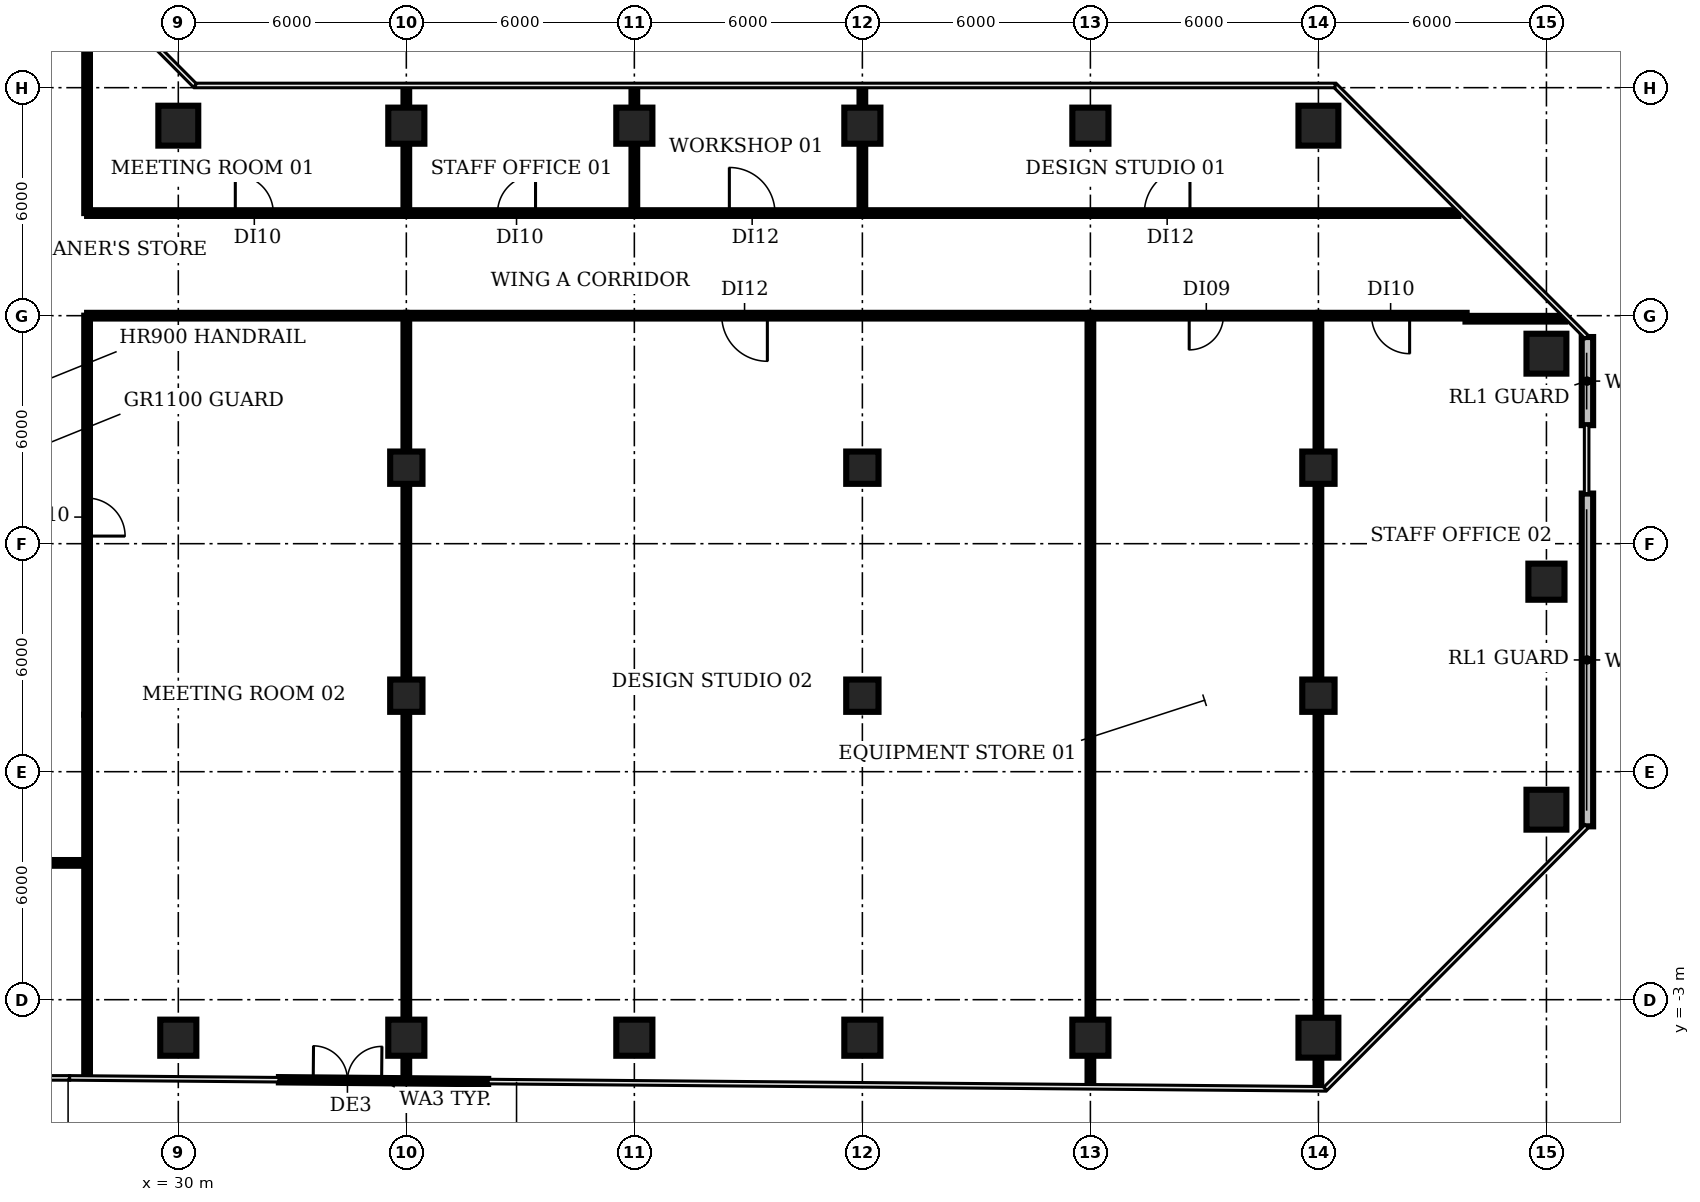
"""IFC4 building model, lengths in metres.
Left out: names, types, materials, properties, quantities, classifications, styles, units other than length and angle.
Written with IfcOpenShell. Run it as: python <this file> out.ifc"""

import sys

from ifc_helpers import new_model, si_unit, direction, frame, frame_2d, origin, origin_2d, place, context, subcontext, project, spatial, rectangle, circle, extrude, element, fill, save


model = new_model("IFC4")
c1 = context("Model", 3, precision=1e-05, world=origin(), true_north=direction((0.0, 1.0)))
c2 = subcontext(c1, "Body", "Model", "MODEL_VIEW")
j1 = project(units=[si_unit("LENGTHUNIT", "METRE"), si_unit("PLANEANGLEUNIT", "RADIAN")], contexts=[c1])
p1 = place(None, origin())
s1 = spatial("IfcSite", under=j1, at=p1, CompositionType="ELEMENT")
p2 = place(p1, origin())
s2 = spatial("IfcBuilding", under=s1, at=p2, CompositionType="ELEMENT")
p3 = place(p2, frame((0.0, 0.0, 50.0)))
s3 = spatial("IfcBuildingStorey", under=s2, at=p3, CompositionType="ELEMENT", Elevation=50.0)
p4 = place(p3, frame((30.0, -4.0, 0.0), z_axis=(0.0, 0.0, 1.0), x_axis=(1.0, 0.0, 0.0)))
e1 = element("IfcColumn", 1, at=p4, inside=s3, PredefinedType="COLUMN", context=c2, shape_type="SweptSolid", body=[
    extrude(rectangle(XDim=0.95, YDim=0.95, at=origin_2d()), origin(), (0.0, 0.0, 1.0), 3.85),
])
p5 = place(p3, frame((30.0, 20.0, 0.0), z_axis=(0.0, 0.0, 1.0), x_axis=(1.0, 0.0, 0.0)))
e2 = element("IfcColumn", 2, at=p5, inside=s3, PredefinedType="COLUMN", context=c2, shape_type="SweptSolid", body=[
    extrude(circle(Radius=0.525, at=origin_2d()), origin(), (0.0, 0.0, 1.0), 3.85),
])
p6 = place(p3, frame((36.0, -4.0, 0.0), z_axis=(0.0, 0.0, 1.0), x_axis=(1.0, 0.0, 0.0)))
e3 = element("IfcColumn", 3, at=p6, inside=s3, PredefinedType="COLUMN", context=c2, shape_type="SweptSolid", body=[
    extrude(rectangle(XDim=0.95, YDim=0.95, at=origin_2d()), origin(), (0.0, 0.0, 1.0), 3.85),
])
for number, where, z_axis, x_axis in (
    (4, (36.0, 5.0, 0.0), (0.0, 0.0, 1.0), (1.0, 0.0, 0.0)),
    (5, (36.0, 11.0, 0.0), (0.0, 0.0, 1.0), (1.0, 0.0, 0.0)),
):
    element("IfcColumn", number, at=place(p3, frame(where, z_axis=z_axis, x_axis=x_axis)), inside=s3, PredefinedType="COLUMN", context=c2, shape_type="SweptSolid", body=[
        extrude(rectangle(XDim=0.85, YDim=0.85, at=origin_2d()), origin(), (0.0, 0.0, 1.0), 3.85),
    ])
for number, where, z_axis, x_axis in (
    (6, (36.0, 20.0, 0.0), (0.0, 0.0, 1.0), (1.0, 0.0, 0.0)),
    (7, (42.0, -4.0, 0.0), (0.0, 0.0, 1.0), (1.0, 0.0, 0.0)),
    (8, (42.0, 20.0, 0.0), (0.0, 0.0, 1.0), (1.0, 0.0, 0.0)),
    (9, (48.0, -4.0, 0.0), (0.0, 0.0, 1.0), (1.0, 0.0, 0.0)),
):
    element("IfcColumn", number, at=place(p3, frame(where, z_axis=z_axis, x_axis=x_axis)), inside=s3, PredefinedType="COLUMN", context=c2, shape_type="SweptSolid", body=[
        extrude(rectangle(XDim=0.95, YDim=0.95, at=origin_2d()), origin(), (0.0, 0.0, 1.0), 3.85),
    ])
for number, where, z_axis, x_axis in (
    (10, (48.0, 5.0, 0.0), (0.0, 0.0, 1.0), (1.0, 0.0, 0.0)),
    (11, (48.0, 11.0, 0.0), (0.0, 0.0, 1.0), (1.0, 0.0, 0.0)),
):
    element("IfcColumn", number, at=place(p3, frame(where, z_axis=z_axis, x_axis=x_axis)), inside=s3, PredefinedType="COLUMN", context=c2, shape_type="SweptSolid", body=[
        extrude(rectangle(XDim=0.85, YDim=0.85, at=origin_2d()), origin(), (0.0, 0.0, 1.0), 3.85),
    ])
for number, where, z_axis, x_axis in (
    (12, (48.0, 20.0, 0.0), (0.0, 0.0, 1.0), (1.0, 0.0, 0.0)),
    (13, (54.0, -4.0, 0.0), (0.0, 0.0, 1.0), (1.0, 0.0, 0.0)),
    (14, (54.0, 20.0, 0.0), (0.0, 0.0, 1.0), (1.0, 0.0, 0.0)),
):
    element("IfcColumn", number, at=place(p3, frame(where, z_axis=z_axis, x_axis=x_axis)), inside=s3, PredefinedType="COLUMN", context=c2, shape_type="SweptSolid", body=[
        extrude(rectangle(XDim=0.95, YDim=0.95, at=origin_2d()), origin(), (0.0, 0.0, 1.0), 3.85),
    ])
p7 = place(p3, frame((60.0, -4.0, 0.0), z_axis=(0.0, 0.0, 1.0), x_axis=(1.0, 0.0, 0.0)))
e15 = element("IfcColumn", 15, at=p7, inside=s3, PredefinedType="COLUMN", context=c2, shape_type="SweptSolid", body=[
    extrude(circle(Radius=0.525, at=origin_2d()), origin(), (0.0, 0.0, 1.0), 3.85),
])
for number, where, z_axis, x_axis in (
    (16, (60.0, 5.0, 0.0), (0.0, 0.0, 1.0), (1.0, 0.0, 0.0)),
    (17, (60.0, 11.0, 0.0), (0.0, 0.0, 1.0), (1.0, 0.0, 0.0)),
):
    element("IfcColumn", number, at=place(p3, frame(where, z_axis=z_axis, x_axis=x_axis)), inside=s3, PredefinedType="COLUMN", context=c2, shape_type="SweptSolid", body=[
        extrude(rectangle(XDim=0.85, YDim=0.85, at=origin_2d()), origin(), (0.0, 0.0, 1.0), 3.85),
    ])
for number, where, z_axis, x_axis in (
    (18, (60.0, 20.0, 0.0), (0.0, 0.0, 1.0), (1.0, 0.0, 0.0)),
    (19, (66.0, 2.0, 0.0), (0.0, 0.0, 1.0), (1.0, 0.0, 0.0)),
):
    element("IfcColumn", number, at=place(p3, frame(where, z_axis=z_axis, x_axis=x_axis)), inside=s3, PredefinedType="COLUMN", context=c2, shape_type="SweptSolid", body=[
        extrude(circle(Radius=0.525, at=origin_2d()), origin(), (0.0, 0.0, 1.0), 3.85),
    ])
p8 = place(p3, frame((66.0, 8.0, 0.0), z_axis=(0.0, 0.0, 1.0), x_axis=(1.0, 0.0, 0.0)))
e20 = element("IfcColumn", 20, at=p8, inside=s3, PredefinedType="COLUMN", context=c2, shape_type="SweptSolid", body=[
    extrude(rectangle(XDim=0.95, YDim=0.95, at=origin_2d()), origin(), (0.0, 0.0, 1.0), 3.85),
])
p9 = place(p3, frame((66.0, 14.0, 0.0), z_axis=(0.0, 0.0, 1.0), x_axis=(1.0, 0.0, 0.0)))
e21 = element("IfcColumn", 21, at=p9, inside=s3, PredefinedType="COLUMN", context=c2, shape_type="SweptSolid", body=[
    extrude(circle(Radius=0.525, at=origin_2d()), origin(), (0.0, 0.0, 1.0), 3.85),
])
p10 = place(p3, frame((32.647, -5.106, 0.0), z_axis=(0.0, 0.0, 1.0), x_axis=(0.999962248572, -0.008689155911, 0.0)))
e22 = element("IfcWall", 22, at=p10, inside=s3, PredefinedType="SOLIDWALL", context=c2, shape_type="SweptSolid", body=[
    extrude(rectangle(XDim=5.507, YDim=0.14, at=frame_2d((2.753, 0.0))), origin(), (0.0, 0.0, 1.0), 3.85),
])
p11 = place(p10, frame((0.903, 0.0, 0.0)))
e23 = element("IfcOpeningElement", 23, at=p11, cuts=e22, PredefinedType="OPENING", context=c2, shape_type="SweptSolid", body=[
    extrude(rectangle(XDim=1.8, YDim=2.4, at=frame_2d((0.9, 1.2))), frame((0.0, 0.08, 0.0), z_axis=(0.0, -1.0, 0.0), x_axis=(1.0, 0.0, 0.0)), (0.0, 0.0, 1.0), 0.16),
])
p12 = place(p3, frame((67.079, 1.562, 0.0), z_axis=(0.0, 0.0, 1.0), x_axis=(0.0, 1.0, 0.0)))
e24 = element("IfcWall", 24, at=p12, inside=s3, PredefinedType="SOLIDWALL", context=c2, shape_type="SweptSolid", body=[
    extrude(rectangle(XDim=8.757, YDim=0.3, at=frame_2d((4.379, 0.0))), origin(), (0.0, 0.0, 1.0), 3.85),
])
p13 = place(p3, frame((67.079, 12.119, 0.0), z_axis=(0.0, 0.0, 1.0), x_axis=(0.0, 1.0, 0.0)))
e25 = element("IfcWall", 25, at=p13, inside=s3, PredefinedType="SOLIDWALL", context=c2, shape_type="SweptSolid", body=[
    extrude(rectangle(XDim=2.319, YDim=0.3, at=frame_2d((1.16, 0.0))), origin(), (0.0, 0.0, 1.0), 3.85),
])
p14 = place(p3, frame((27.6, -5.01, 0.0), z_axis=(0.0, 0.0, 1.0), x_axis=(0.0, 1.0, 0.0)))
e26 = element("IfcWall", 26, at=p14, inside=s3, PredefinedType="PARTITIONING", context=c2, shape_type="SweptSolid", body=[
    extrude(rectangle(XDim=5.61, YDim=0.15, at=frame_2d((2.805, 0.0))), origin(), (0.0, 0.0, 1.0), 2.83),
])
p15 = place(p3, frame((27.6, 0.6, 0.0), z_axis=(0.0, 0.0, 1.0), x_axis=(-1.0, 0.0, 0.0)))
e27 = element("IfcWall", 27, at=p15, inside=s3, PredefinedType="PARTITIONING", context=c2, shape_type="SweptSolid", body=[
    extrude(rectangle(XDim=25.2, YDim=0.15, at=frame_2d((12.6, 0.0))), origin(), (0.0, 0.0, 1.0), 2.83),
])
p16 = place(p15, frame((12.1, 0.0, 0.0)))
e28 = element("IfcOpeningElement", 28, at=p16, cuts=e27, PredefinedType="OPENING", context=c2, shape_type="SweptSolid", body=[
    extrude(rectangle(XDim=1.2, YDim=2.1, at=frame_2d((0.6, 1.05))), frame((0.0, 0.085, 0.0), z_axis=(0.0, -1.0, 0.0), x_axis=(1.0, 0.0, 0.0)), (0.0, 0.0, 1.0), 0.17),
])
p17 = place(p3, frame((27.6, 0.6, 0.0), z_axis=(0.0, 0.0, 1.0), x_axis=(0.0, 1.0, 0.0)))
e29 = element("IfcWall", 29, at=p17, inside=s3, PredefinedType="PARTITIONING", context=c2, shape_type="SweptSolid", body=[
    extrude(rectangle(XDim=3.9, YDim=0.15, at=frame_2d((1.95, 0.0))), origin(), (0.0, 0.0, 1.0), 2.83),
])
p18 = place(p3, frame((27.6, 15.0, 0.0), z_axis=(0.0, 0.0, 1.0), x_axis=(0.0, -1.0, 0.0)))
e30 = element("IfcWall", 30, at=p18, inside=s3, PredefinedType="PARTITIONING", context=c2, shape_type="SweptSolid", body=[
    extrude(rectangle(XDim=10.5, YDim=0.15, at=frame_2d((5.25, 0.0))), origin(), (0.0, 0.0, 1.0), 2.83),
])
p19 = place(p18, frame((4.8, 0.0, 0.0)))
e31 = element("IfcOpeningElement", 31, at=p19, cuts=e30, PredefinedType="OPENING", context=c2, shape_type="SweptSolid", body=[
    extrude(rectangle(XDim=1.0, YDim=2.1, at=frame_2d((0.5, 1.05))), frame((0.0, 0.085, 0.0), z_axis=(0.0, -1.0, 0.0), x_axis=(1.0, 0.0, 0.0)), (0.0, 0.0, 1.0), 0.17),
])
p20 = place(p3, frame((27.6, 15.0, 0.0), z_axis=(0.0, 0.0, 1.0), x_axis=(1.0, 0.0, 0.0)))
e32 = element("IfcWall", 32, at=p20, inside=s3, PredefinedType="PARTITIONING", context=c2, shape_type="SweptSolid", body=[
    extrude(rectangle(XDim=8.4, YDim=0.15, at=frame_2d((4.2, 0.0))), origin(), (0.0, 0.0, 1.0), 2.83),
])
p21 = place(p3, frame((27.6, 17.7, 0.0), z_axis=(0.0, 0.0, 1.0), x_axis=(0.0, 1.0, 0.0)))
e33 = element("IfcWall", 33, at=p21, inside=s3, PredefinedType="PARTITIONING", context=c2, shape_type="SweptSolid", body=[
    extrude(rectangle(XDim=6.14, YDim=0.15, at=frame_2d((3.07, 0.0))), origin(), (0.0, 0.0, 1.0), 2.83),
])
p22 = place(p3, frame((27.6, 17.7, 0.0), z_axis=(0.0, 0.0, 1.0), x_axis=(1.0, 0.0, 0.0)))
e34 = element("IfcWall", 34, at=p22, inside=s3, PredefinedType="PARTITIONING", context=c2, shape_type="SweptSolid", body=[
    extrude(rectangle(XDim=8.4, YDim=0.15, at=frame_2d((4.2, 0.0))), origin(), (0.0, 0.0, 1.0), 2.83),
])
p23 = place(p22, frame((3.9, 0.0, 0.0)))
e35 = element("IfcOpeningElement", 35, at=p23, cuts=e34, PredefinedType="OPENING", context=c2, shape_type="SweptSolid", body=[
    extrude(rectangle(XDim=1.0, YDim=2.1, at=frame_2d((0.5, 1.05))), frame((0.0, 0.085, 0.0), z_axis=(0.0, -1.0, 0.0), x_axis=(1.0, 0.0, 0.0)), (0.0, 0.0, 1.0), 0.17),
])
p24 = place(p3, frame((36.0, -5.09, 0.0), z_axis=(0.0, 0.0, 1.0), x_axis=(0.0, 1.0, 0.0)))
e36 = element("IfcWall", 36, at=p24, inside=s3, PredefinedType="PARTITIONING", context=c2, shape_type="SweptSolid", body=[
    extrude(rectangle(XDim=20.09, YDim=0.15, at=frame_2d((10.045, 0.0))), origin(), (0.0, 0.0, 1.0), 2.83),
])
p25 = place(p3, frame((36.0, 17.7, 0.0), z_axis=(0.0, 0.0, 1.0), x_axis=(0.0, 1.0, 0.0)))
e37 = element("IfcWall", 37, at=p25, inside=s3, PredefinedType="PARTITIONING", context=c2, shape_type="SweptSolid", body=[
    extrude(rectangle(XDim=3.31, YDim=0.15, at=frame_2d((1.655, 0.0))), origin(), (0.0, 0.0, 1.0), 2.83),
])
p26 = place(p3, frame((36.0, 17.7, 0.0), z_axis=(0.0, 0.0, 1.0), x_axis=(1.0, 0.0, 0.0)))
e38 = element("IfcWall", 38, at=p26, inside=s3, PredefinedType="PARTITIONING", context=c2, shape_type="SweptSolid", body=[
    extrude(rectangle(XDim=6.0, YDim=0.15, at=frame_2d((3.0, 0.0))), origin(), (0.0, 0.0, 1.0), 2.83),
])
p27 = place(p26, frame((2.4, 0.0, 0.0)))
e39 = element("IfcOpeningElement", 39, at=p27, cuts=e38, PredefinedType="OPENING", context=c2, shape_type="SweptSolid", body=[
    extrude(rectangle(XDim=1.0, YDim=2.1, at=frame_2d((0.5, 1.05))), frame((0.0, 0.085, 0.0), z_axis=(0.0, -1.0, 0.0), x_axis=(1.0, 0.0, 0.0)), (0.0, 0.0, 1.0), 0.17),
])
p28 = place(p3, frame((42.0, 17.7, 0.0), z_axis=(0.0, 0.0, 1.0), x_axis=(0.0, 1.0, 0.0)))
e40 = element("IfcWall", 40, at=p28, inside=s3, PredefinedType="PARTITIONING", context=c2, shape_type="SweptSolid", body=[
    extrude(rectangle(XDim=3.31, YDim=0.15, at=frame_2d((1.655, 0.0))), origin(), (0.0, 0.0, 1.0), 2.83),
])
p29 = place(p3, frame((42.0, 17.7, 0.0), z_axis=(0.0, 0.0, 1.0), x_axis=(1.0, 0.0, 0.0)))
e41 = element("IfcWall", 41, at=p29, inside=s3, PredefinedType="PARTITIONING", context=c2, shape_type="SweptSolid", body=[
    extrude(rectangle(XDim=6.0, YDim=0.15, at=frame_2d((3.0, 0.0))), origin(), (0.0, 0.0, 1.0), 2.83),
])
p30 = place(p29, frame((2.5, 0.0, 0.0)))
e42 = element("IfcOpeningElement", 42, at=p30, cuts=e41, PredefinedType="OPENING", context=c2, shape_type="SweptSolid", body=[
    extrude(rectangle(XDim=1.2, YDim=2.1, at=frame_2d((0.6, 1.05))), frame((0.0, 0.085, 0.0), z_axis=(0.0, -1.0, 0.0), x_axis=(1.0, 0.0, 0.0)), (0.0, 0.0, 1.0), 0.17),
])
p31 = place(p3, frame((48.0, 17.7, 0.0), z_axis=(0.0, 0.0, 1.0), x_axis=(0.0, 1.0, 0.0)))
e43 = element("IfcWall", 43, at=p31, inside=s3, PredefinedType="PARTITIONING", context=c2, shape_type="SweptSolid", body=[
    extrude(rectangle(XDim=3.31, YDim=0.15, at=frame_2d((1.655, 0.0))), origin(), (0.0, 0.0, 1.0), 2.83),
])
p32 = place(p3, frame((48.0, 17.7, 0.0), z_axis=(0.0, 0.0, 1.0), x_axis=(1.0, 0.0, 0.0)))
e44 = element("IfcWall", 44, at=p32, inside=s3, PredefinedType="PARTITIONING", context=c2, shape_type="SweptSolid", body=[
    extrude(rectangle(XDim=15.683, YDim=0.15, at=frame_2d((7.842, 0.0))), origin(), (0.0, 0.0, 1.0), 2.83),
])
p33 = place(p32, frame((7.42, 0.0, 0.0)))
e45 = element("IfcOpeningElement", 45, at=p33, cuts=e44, PredefinedType="OPENING", context=c2, shape_type="SweptSolid", body=[
    extrude(rectangle(XDim=1.2, YDim=2.1, at=frame_2d((0.6, 1.05))), frame((0.0, 0.085, 0.0), z_axis=(0.0, -1.0, 0.0), x_axis=(1.0, 0.0, 0.0)), (0.0, 0.0, 1.0), 0.17),
])
p34 = place(p3, frame((54.0, -5.24, 0.0), z_axis=(0.0, 0.0, 1.0), x_axis=(0.0, 1.0, 0.0)))
e46 = element("IfcWall", 46, at=p34, inside=s3, PredefinedType="PARTITIONING", context=c2, shape_type="SweptSolid", body=[
    extrude(rectangle(XDim=20.24, YDim=0.15, at=frame_2d((10.12, 0.0))), origin(), (0.0, 0.0, 1.0), 2.83),
])
p35 = place(p3, frame((54.0, 15.0, 0.0), z_axis=(0.0, 0.0, 1.0), x_axis=(-1.0, 0.0, 0.0)))
e47 = element("IfcWall", 47, at=p35, inside=s3, PredefinedType="PARTITIONING", context=c2, shape_type="SweptSolid", body=[
    extrude(rectangle(XDim=18.0, YDim=0.15, at=frame_2d((9.0, 0.0))), origin(), (0.0, 0.0, 1.0), 2.83),
])
p36 = place(p35, frame((8.5, 0.0, 0.0)))
e48 = element("IfcOpeningElement", 48, at=p36, cuts=e47, PredefinedType="OPENING", context=c2, shape_type="SweptSolid", body=[
    extrude(rectangle(XDim=1.2, YDim=2.1, at=frame_2d((0.6, 1.05))), frame((0.0, 0.085, 0.0), z_axis=(0.0, -1.0, 0.0), x_axis=(1.0, 0.0, 0.0)), (0.0, 0.0, 1.0), 0.17),
])
p37 = place(p3, frame((60.0, -5.29, 0.0), z_axis=(0.0, 0.0, 1.0), x_axis=(0.0, 1.0, 0.0)))
e49 = element("IfcWall", 49, at=p37, inside=s3, PredefinedType="PARTITIONING", context=c2, shape_type="SweptSolid", body=[
    extrude(rectangle(XDim=20.29, YDim=0.15, at=frame_2d((10.145, 0.0))), origin(), (0.0, 0.0, 1.0), 2.83),
])
p38 = place(p3, frame((60.0, 15.0, 0.0), z_axis=(0.0, 0.0, 1.0), x_axis=(-1.0, 0.0, 0.0)))
e50 = element("IfcWall", 50, at=p38, inside=s3, PredefinedType="PARTITIONING", context=c2, shape_type="SweptSolid", body=[
    extrude(rectangle(XDim=6.0, YDim=0.15, at=frame_2d((3.0, 0.0))), origin(), (0.0, 0.0, 1.0), 2.83),
])
p39 = place(p38, frame((2.5, 0.0, 0.0)))
e51 = element("IfcOpeningElement", 51, at=p39, cuts=e50, PredefinedType="OPENING", context=c2, shape_type="SweptSolid", body=[
    extrude(rectangle(XDim=0.9, YDim=2.1, at=frame_2d((0.45, 1.05))), frame((0.0, 0.085, 0.0), z_axis=(0.0, -1.0, 0.0), x_axis=(1.0, 0.0, 0.0)), (0.0, 0.0, 1.0), 0.17),
])
p40 = place(p3, frame((63.87, 14.92, 0.0), z_axis=(0.0, 0.0, 1.0), x_axis=(1.0, 0.0, 0.0)))
e52 = element("IfcWall", 52, at=p40, inside=s3, PredefinedType="PARTITIONING", context=c2, shape_type="SweptSolid", body=[
    extrude(rectangle(XDim=2.621, YDim=0.15, at=frame_2d((1.311, 0.0))), origin(), (0.0, 0.0, 1.0), 2.83),
])
p41 = place(p3, frame((63.9, 15.0, 0.0), z_axis=(0.0, 0.0, 1.0), x_axis=(-1.0, 0.0, 0.0)))
e53 = element("IfcWall", 53, at=p41, inside=s3, PredefinedType="PARTITIONING", context=c2, shape_type="SweptSolid", body=[
    extrude(rectangle(XDim=3.9, YDim=0.15, at=frame_2d((1.95, 0.0))), origin(), (0.0, 0.0, 1.0), 2.83),
])
p42 = place(p41, frame((1.5, 0.0, 0.0)))
e54 = element("IfcOpeningElement", 54, at=p42, cuts=e53, PredefinedType="OPENING", context=c2, shape_type="SweptSolid", body=[
    extrude(rectangle(XDim=1.0, YDim=2.1, at=frame_2d((0.5, 1.05))), frame((0.0, 0.085, 0.0), z_axis=(0.0, -1.0, 0.0), x_axis=(1.0, 0.0, 0.0)), (0.0, 0.0, 1.0), 0.17),
])
p43 = place(p11, origin())
e55 = element("IfcDoor", 55, at=p43, inside=s3, OperationType="DOUBLE_DOOR_DOUBLE_SWING", PredefinedType="DOOR", context=c2, shape_type="SweptSolid", body=[
    extrude(rectangle(XDim=1.8, YDim=2.4, at=frame_2d((0.9, 1.2))), frame((0.0, 0.025, 0.0), z_axis=(0.0, -1.0, 0.0), x_axis=(1.0, 0.0, 0.0)), (0.0, 0.0, 1.0), 0.05),
])
fill(e23, e55)
p44 = place(p19, origin())
e56 = element("IfcDoor", 56, at=p44, inside=s3, OperationType="SINGLE_SWING_RIGHT", PredefinedType="DOOR", context=c2, shape_type="SweptSolid", body=[
    extrude(rectangle(XDim=1.0, YDim=2.1, at=frame_2d((0.5, 1.05))), frame((0.0, 0.025, 0.0), z_axis=(0.0, -1.0, 0.0), x_axis=(1.0, 0.0, 0.0)), (0.0, 0.0, 1.0), 0.05),
])
fill(e31, e56)
p45 = place(p23, origin())
e57 = element("IfcDoor", 57, at=p45, inside=s3, OperationType="SINGLE_SWING_LEFT", PredefinedType="DOOR", context=c2, shape_type="SweptSolid", body=[
    extrude(rectangle(XDim=1.0, YDim=2.1, at=frame_2d((0.5, 1.05))), frame((0.0, 0.025, 0.0), z_axis=(0.0, -1.0, 0.0), x_axis=(1.0, 0.0, 0.0)), (0.0, 0.0, 1.0), 0.05),
])
fill(e35, e57)
p46 = place(p27, origin())
e58 = element("IfcDoor", 58, at=p46, inside=s3, OperationType="SINGLE_SWING_RIGHT", PredefinedType="DOOR", context=c2, shape_type="SweptSolid", body=[
    extrude(rectangle(XDim=1.0, YDim=2.1, at=frame_2d((0.5, 1.05))), frame((0.0, 0.025, 0.0), z_axis=(0.0, -1.0, 0.0), x_axis=(1.0, 0.0, 0.0)), (0.0, 0.0, 1.0), 0.05),
])
fill(e39, e58)
p47 = place(p30, origin())
e59 = element("IfcDoor", 59, at=p47, inside=s3, OperationType="SINGLE_SWING_LEFT", PredefinedType="DOOR", context=c2, shape_type="SweptSolid", body=[
    extrude(rectangle(XDim=1.2, YDim=2.1, at=frame_2d((0.6, 1.05))), frame((0.0, 0.025, 0.0), z_axis=(0.0, -1.0, 0.0), x_axis=(1.0, 0.0, 0.0)), (0.0, 0.0, 1.0), 0.05),
])
fill(e42, e59)
p48 = place(p33, origin())
e60 = element("IfcDoor", 60, at=p48, inside=s3, OperationType="SINGLE_SWING_RIGHT", PredefinedType="DOOR", context=c2, shape_type="SweptSolid", body=[
    extrude(rectangle(XDim=1.2, YDim=2.1, at=frame_2d((0.6, 1.05))), frame((0.0, 0.025, 0.0), z_axis=(0.0, -1.0, 0.0), x_axis=(1.0, 0.0, 0.0)), (0.0, 0.0, 1.0), 0.05),
])
fill(e45, e60)
p49 = place(p36, origin())
e61 = element("IfcDoor", 61, at=p49, inside=s3, OperationType="SINGLE_SWING_LEFT", PredefinedType="DOOR", context=c2, shape_type="SweptSolid", body=[
    extrude(rectangle(XDim=1.2, YDim=2.1, at=frame_2d((0.6, 1.05))), frame((0.0, 0.025, 0.0), z_axis=(0.0, -1.0, 0.0), x_axis=(1.0, 0.0, 0.0)), (0.0, 0.0, 1.0), 0.05),
])
fill(e48, e61)
p50 = place(p39, origin())
e62 = element("IfcDoor", 62, at=p50, inside=s3, OperationType="SINGLE_SWING_RIGHT", PredefinedType="DOOR", context=c2, shape_type="SweptSolid", body=[
    extrude(rectangle(XDim=0.9, YDim=2.1, at=frame_2d((0.45, 1.05))), frame((0.0, 0.025, 0.0), z_axis=(0.0, -1.0, 0.0), x_axis=(1.0, 0.0, 0.0)), (0.0, 0.0, 1.0), 0.05),
])
fill(e51, e62)
p51 = place(p42, origin())
e63 = element("IfcDoor", 63, at=p51, inside=s3, OperationType="SINGLE_SWING_LEFT", PredefinedType="DOOR", context=c2, shape_type="SweptSolid", body=[
    extrude(rectangle(XDim=1.0, YDim=2.1, at=frame_2d((0.5, 1.05))), frame((0.0, 0.025, 0.0), z_axis=(0.0, -1.0, 0.0), x_axis=(1.0, 0.0, 0.0)), (0.0, 0.0, 1.0), 0.05),
])
fill(e54, e63)
save(model, sys.argv[1])
